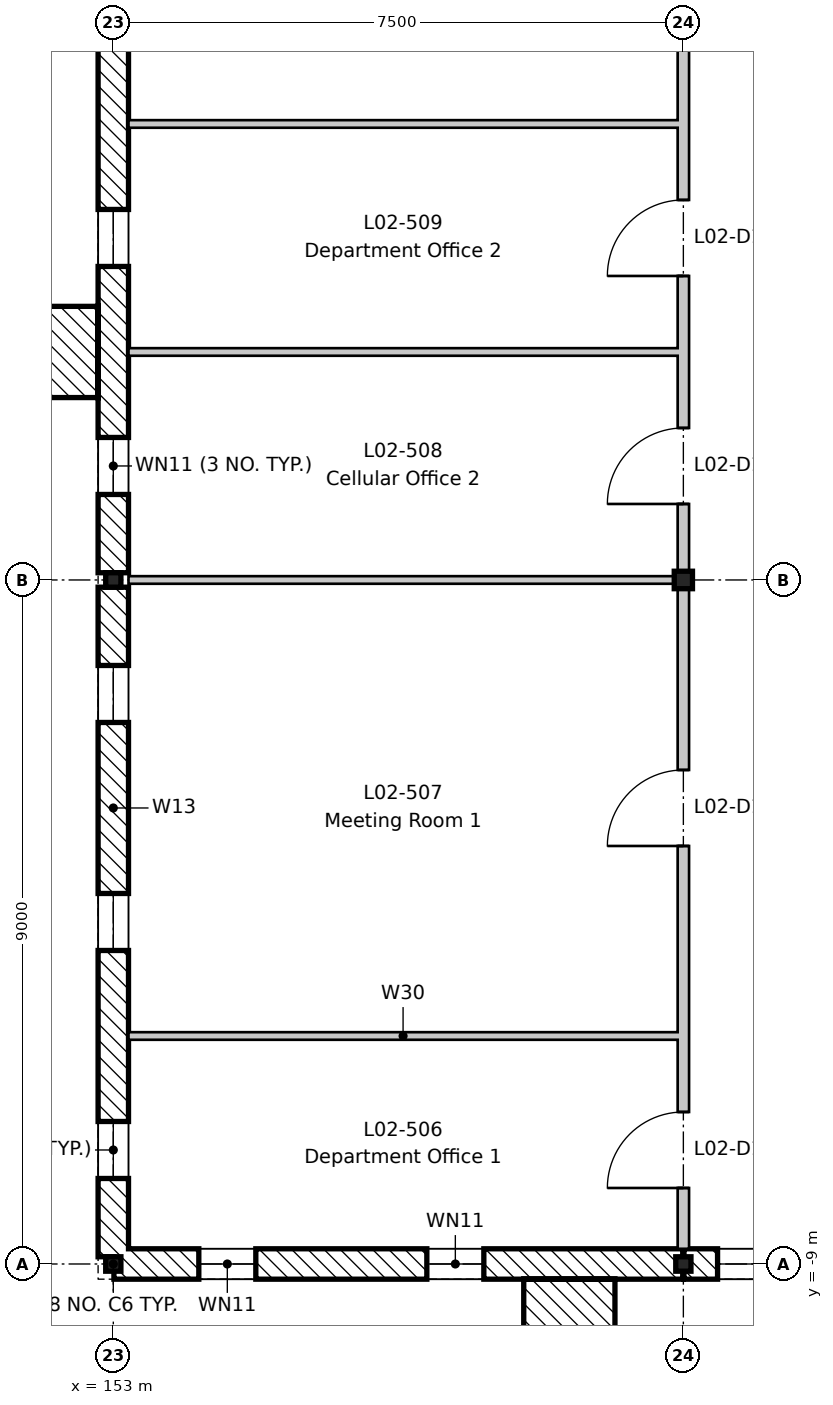
"""IFC4 building model, lengths in metres.
Left out: names, types, materials, properties, quantities, classifications, styles, units other than length and angle.
Written with IfcOpenShell. Run it as: python <this file> out.ifc"""

import sys

from ifc_helpers import new_model, si_unit, direction, frame, frame_2d, origin, origin_2d, place, context, subcontext, project, spatial, rectangle, i_section, extrude, element, fill, save


model = new_model("IFC4")
c1 = context("Model", 3, precision=1e-05, world=origin(), true_north=direction((0.0, 1.0)))
c2 = subcontext(c1, "Body", "Model", "MODEL_VIEW")
j1 = project(units=[si_unit("LENGTHUNIT", "METRE"), si_unit("PLANEANGLEUNIT", "RADIAN")], contexts=[c1])
p1 = place(None, origin())
s1 = spatial("IfcSite", under=j1, at=p1, CompositionType="ELEMENT")
p2 = place(p1, origin())
s2 = spatial("IfcBuilding", under=s1, at=p2, CompositionType="ELEMENT")
p3 = place(p2, frame((0.0, 0.0, 9.9)))
s3 = spatial("IfcBuildingStorey", under=s2, at=p3, CompositionType="ELEMENT", Elevation=9.9)
for number, where, z_axis, x_axis in (
    (1, (153.0, -9.0, -0.2), (0.0, 0.0, 1.0), (1.0, 0.0, 0.0)),
    (2, (153.0, 0.0, -0.2), (0.0, 0.0, 1.0), (1.0, 0.0, 0.0)),
    (3, (160.5, -9.0, -0.2), (0.0, 0.0, 1.0), (1.0, 0.0, 0.0)),
):
    element("IfcColumn", number, at=place(p3, frame(where, z_axis=z_axis, x_axis=x_axis)), inside=s3, PredefinedType="COLUMN", context=c2, shape_type="SweptSolid", body=[
        extrude(i_section(OverallWidth=0.2, OverallDepth=0.19, WebThickness=0.007, FlangeThickness=0.01, FilletRadius=0.018, at=origin_2d()), origin(), (0.0, 0.0, 1.0), 4.45),
    ])
p4 = place(p3, frame((160.5, 0.0, -0.2), z_axis=(0.0, 0.0, 1.0), x_axis=(1.0, 0.0, 0.0)))
e4 = element("IfcColumn", 4, at=p4, inside=s3, PredefinedType="COLUMN", context=c2, shape_type="SweptSolid", body=[
    extrude(i_section(OverallWidth=0.24, OverallDepth=0.23, WebThickness=0.008, FlangeThickness=0.012, FilletRadius=0.021, at=origin_2d()), origin(), (0.0, 0.0, 1.0), 4.45),
])
p5 = place(p3, frame((153.0, -8.905, 0.0), z_axis=(0.0, 0.0, 1.0), x_axis=(0.0, 1.0, 0.0)))
e5 = element("IfcWall", 5, at=p5, inside=s3, PredefinedType="STANDARD", context=c2, shape_type="SweptSolid", body=[
    extrude(rectangle(XDim=8.81, YDim=0.4, at=frame_2d((4.405, 0.0))), origin(), (0.0, 0.0, 1.0), 3.85),
])
p6 = place(p5, frame((1.03, 0.0, 1.5)))
e6 = element("IfcOpeningElement", 6, at=p6, cuts=e5, PredefinedType="OPENING", context=c2, shape_type="SweptSolid", body=[
    extrude(rectangle(XDim=0.75, YDim=1.2, at=frame_2d((0.375, 0.6))), frame((0.0, 0.21, 0.0), z_axis=(0.0, -1.0, 0.0), x_axis=(1.0, 0.0, 0.0)), (0.0, 0.0, 1.0), 0.42),
])
p7 = place(p5, frame((4.03, 0.0, 1.5)))
e7 = element("IfcOpeningElement", 7, at=p7, cuts=e5, PredefinedType="OPENING", context=c2, shape_type="SweptSolid", body=[
    extrude(rectangle(XDim=0.75, YDim=1.2, at=frame_2d((0.375, 0.6))), frame((0.0, 0.21, 0.0), z_axis=(0.0, -1.0, 0.0), x_axis=(1.0, 0.0, 0.0)), (0.0, 0.0, 1.0), 0.42),
])
p8 = place(p5, frame((7.03, 0.0, 1.5)))
e8 = element("IfcOpeningElement", 8, at=p8, cuts=e5, PredefinedType="OPENING", context=c2, shape_type="SweptSolid", body=[
    extrude(rectangle(XDim=0.75, YDim=1.2, at=frame_2d((0.375, 0.6))), frame((0.0, 0.21, 0.0), z_axis=(0.0, -1.0, 0.0), x_axis=(1.0, 0.0, 0.0)), (0.0, 0.0, 1.0), 0.42),
])
p9 = place(p3, frame((153.0, 0.095, 0.0), z_axis=(0.0, 0.0, 1.0), x_axis=(0.0, 1.0, 0.0)))
e9 = element("IfcWall", 9, at=p9, inside=s3, PredefinedType="STANDARD", context=c2, shape_type="SweptSolid", body=[
    extrude(rectangle(XDim=8.81, YDim=0.4, at=frame_2d((4.405, 0.0))), origin(), (0.0, 0.0, 1.0), 3.85),
])
p10 = place(p9, frame((1.03, 0.0, 1.5)))
e10 = element("IfcOpeningElement", 10, at=p10, cuts=e9, PredefinedType="OPENING", context=c2, shape_type="SweptSolid", body=[
    extrude(rectangle(XDim=0.75, YDim=1.2, at=frame_2d((0.375, 0.6))), frame((0.0, 0.21, 0.0), z_axis=(0.0, -1.0, 0.0), x_axis=(1.0, 0.0, 0.0)), (0.0, 0.0, 1.0), 0.42),
])
p11 = place(p9, frame((4.03, 0.0, 1.5)))
e11 = element("IfcOpeningElement", 11, at=p11, cuts=e9, PredefinedType="OPENING", context=c2, shape_type="SweptSolid", body=[
    extrude(rectangle(XDim=0.75, YDim=1.2, at=frame_2d((0.375, 0.6))), frame((0.0, 0.21, 0.0), z_axis=(0.0, -1.0, 0.0), x_axis=(1.0, 0.0, 0.0)), (0.0, 0.0, 1.0), 0.42),
])
p12 = place(p9, frame((7.03, 0.0, 1.5)))
e12 = element("IfcOpeningElement", 12, at=p12, cuts=e9, PredefinedType="OPENING", context=c2, shape_type="SweptSolid", body=[
    extrude(rectangle(XDim=0.75, YDim=1.2, at=frame_2d((0.375, 0.6))), frame((0.0, 0.21, 0.0), z_axis=(0.0, -1.0, 0.0), x_axis=(1.0, 0.0, 0.0)), (0.0, 0.0, 1.0), 0.42),
])
p13 = place(p3, frame((160.492, -9.0, 0.0), z_axis=(0.0, 0.0, 1.0), x_axis=(-1.0, 0.0, 0.0)))
e13 = element("IfcWall", 13, at=p13, inside=s3, PredefinedType="STANDARD", context=c2, shape_type="SweptSolid", body=[
    extrude(rectangle(XDim=7.483, YDim=0.4, at=frame_2d((3.742, 0.0))), origin(), (0.0, 0.0, 1.0), 3.92),
])
p14 = place(p13, frame((5.617, 0.0, 1.5)))
e14 = element("IfcOpeningElement", 14, at=p14, cuts=e13, PredefinedType="OPENING", context=c2, shape_type="SweptSolid", body=[
    extrude(rectangle(XDim=0.75, YDim=1.2, at=frame_2d((0.375, 0.6))), frame((0.0, 0.21, 0.0), z_axis=(0.0, -1.0, 0.0), x_axis=(1.0, 0.0, 0.0)), (0.0, 0.0, 1.0), 0.42),
])
p15 = place(p13, frame((2.617, 0.0, 1.5)))
e15 = element("IfcOpeningElement", 15, at=p15, cuts=e13, PredefinedType="OPENING", context=c2, shape_type="SweptSolid", body=[
    extrude(rectangle(XDim=0.75, YDim=1.2, at=frame_2d((0.375, 0.6))), frame((0.0, 0.21, 0.0), z_axis=(0.0, -1.0, 0.0), x_axis=(1.0, 0.0, 0.0)), (0.0, 0.0, 1.0), 0.42),
])
p16 = place(p3, frame((163.492, -9.0, 0.0), z_axis=(0.0, 0.0, 1.0), x_axis=(-1.0, 0.0, 0.0)))
e16 = element("IfcWall", 16, at=p16, inside=s3, PredefinedType="STANDARD", context=c2, shape_type="SweptSolid", body=[
    extrude(rectangle(XDim=2.983, YDim=0.4, at=frame_2d((1.492, 0.0))), origin(), (0.0, 0.0, 1.0), 4.05),
])
p17 = place(p16, frame((0.442, 0.0, 0.9)))
e17 = element("IfcOpeningElement", 17, at=p17, cuts=e16, PredefinedType="OPENING", context=c2, shape_type="SweptSolid", body=[
    extrude(rectangle(XDim=2.1, YDim=2.1, at=frame_2d((1.05, 1.05))), frame((0.0, 0.21, 0.0), z_axis=(0.0, -1.0, 0.0), x_axis=(1.0, 0.0, 0.0)), (0.0, 0.0, 1.0), 0.42),
])
for number, where, z_axis, x_axis in (
    (18, (152.2, 2.4, 0.0), (0.0, 0.0, 1.0), (0.0, 1.0, 0.0)),
    (19, (158.4, -9.8, 0.0), (0.0, 0.0, 1.0), (1.0, 0.0, 0.0)),
):
    element("IfcWall", number, at=place(p3, frame(where, z_axis=z_axis, x_axis=x_axis)), inside=s3, PredefinedType="STANDARD", context=c2, shape_type="SweptSolid", body=[
        extrude(rectangle(XDim=1.2, YDim=1.2, at=frame_2d((0.6, 0.0))), origin(), (0.0, 0.0, 1.0), 3.65),
    ])
p18 = place(p3, frame((153.2, -6.0, 0.0), z_axis=(0.0, 0.0, 1.0), x_axis=(1.0, 0.0, 0.0)))
e20 = element("IfcWall", 20, at=p18, inside=s3, PredefinedType="PARTITIONING", context=c2, shape_type="SweptSolid", body=[
    extrude(rectangle(XDim=7.225, YDim=0.1, at=frame_2d((3.613, 0.0))), origin(), (0.0, 0.0, 1.0), 4.25),
])
p19 = place(p3, frame((153.2, 0.0, 0.0), z_axis=(0.0, 0.0, 1.0), x_axis=(1.0, 0.0, 0.0)))
e21 = element("IfcWall", 21, at=p19, inside=s3, PredefinedType="PARTITIONING", context=c2, shape_type="SweptSolid", body=[
    extrude(rectangle(XDim=7.225, YDim=0.1, at=frame_2d((3.613, 0.0))), origin(), (0.0, 0.0, 1.0), 3.9),
])
for number, where, z_axis, x_axis in (
    (22, (153.2, 3.0, 0.0), (0.0, 0.0, 1.0), (1.0, 0.0, 0.0)),
    (23, (153.2, 6.0, 0.0), (0.0, 0.0, 1.0), (1.0, 0.0, 0.0)),
):
    element("IfcWall", number, at=place(p3, frame(where, z_axis=z_axis, x_axis=x_axis)), inside=s3, PredefinedType="PARTITIONING", context=c2, shape_type="SweptSolid", body=[
        extrude(rectangle(XDim=7.225, YDim=0.1, at=frame_2d((3.613, 0.0))), origin(), (0.0, 0.0, 1.0), 4.25),
    ])
p20 = place(p3, frame((160.5, -8.8, 0.0), z_axis=(0.0, 0.0, 1.0), x_axis=(0.0, 1.0, 0.0)))
e24 = element("IfcWall", 24, at=p20, inside=s3, PredefinedType="PARTITIONING", context=c2, shape_type="SweptSolid", body=[
    extrude(rectangle(XDim=62.6, YDim=0.15, at=frame_2d((31.3, 0.0))), origin(), (0.0, 0.0, 1.0), 3.73),
])
p21 = place(p20, frame((0.8, 0.0, 0.0)))
e25 = element("IfcOpeningElement", 25, at=p21, cuts=e24, PredefinedType="OPENING", context=c2, shape_type="SweptSolid", body=[
    extrude(rectangle(XDim=1.0, YDim=2.1, at=frame_2d((0.5, 1.05))), frame((0.0, 0.085, 0.0), z_axis=(0.0, -1.0, 0.0), x_axis=(1.0, 0.0, 0.0)), (0.0, 0.0, 1.0), 0.17),
])
p22 = place(p20, frame((5.3, 0.0, 0.0)))
e26 = element("IfcOpeningElement", 26, at=p22, cuts=e24, PredefinedType="OPENING", context=c2, shape_type="SweptSolid", body=[
    extrude(rectangle(XDim=1.0, YDim=2.1, at=frame_2d((0.5, 1.05))), frame((0.0, 0.085, 0.0), z_axis=(0.0, -1.0, 0.0), x_axis=(1.0, 0.0, 0.0)), (0.0, 0.0, 1.0), 0.17),
])
p23 = place(p20, frame((9.8, 0.0, 0.0)))
e27 = element("IfcOpeningElement", 27, at=p23, cuts=e24, PredefinedType="OPENING", context=c2, shape_type="SweptSolid", body=[
    extrude(rectangle(XDim=1.0, YDim=2.1, at=frame_2d((0.5, 1.05))), frame((0.0, 0.085, 0.0), z_axis=(0.0, -1.0, 0.0), x_axis=(1.0, 0.0, 0.0)), (0.0, 0.0, 1.0), 0.17),
])
p24 = place(p20, frame((12.8, 0.0, 0.0)))
e28 = element("IfcOpeningElement", 28, at=p24, cuts=e24, PredefinedType="OPENING", context=c2, shape_type="SweptSolid", body=[
    extrude(rectangle(XDim=1.0, YDim=2.1, at=frame_2d((0.5, 1.05))), frame((0.0, 0.085, 0.0), z_axis=(0.0, -1.0, 0.0), x_axis=(1.0, 0.0, 0.0)), (0.0, 0.0, 1.0), 0.17),
])
p25 = place(p20, frame((18.6, 0.0, 0.0)))
e29 = element("IfcOpeningElement", 29, at=p25, cuts=e24, PredefinedType="OPENING", context=c2, shape_type="SweptSolid", body=[
    extrude(rectangle(XDim=1.4, YDim=2.1, at=frame_2d((0.7, 1.05))), frame((0.0, 0.085, 0.0), z_axis=(0.0, -1.0, 0.0), x_axis=(1.0, 0.0, 0.0)), (0.0, 0.0, 1.0), 0.17),
])
p26 = place(p20, frame((27.55, 0.0, 0.0)))
e30 = element("IfcOpeningElement", 30, at=p26, cuts=e24, PredefinedType="OPENING", context=c2, shape_type="SweptSolid", body=[
    extrude(rectangle(XDim=1.0, YDim=2.1, at=frame_2d((0.5, 1.05))), frame((0.0, 0.085, 0.0), z_axis=(0.0, -1.0, 0.0), x_axis=(1.0, 0.0, 0.0)), (0.0, 0.0, 1.0), 0.17),
])
p27 = place(p20, frame((30.8, 0.0, 0.0)))
e31 = element("IfcOpeningElement", 31, at=p27, cuts=e24, PredefinedType="OPENING", context=c2, shape_type="SweptSolid", body=[
    extrude(rectangle(XDim=1.0, YDim=2.1, at=frame_2d((0.5, 1.05))), frame((0.0, 0.085, 0.0), z_axis=(0.0, -1.0, 0.0), x_axis=(1.0, 0.0, 0.0)), (0.0, 0.0, 1.0), 0.17),
])
p28 = place(p20, frame((33.8, 0.0, 0.0)))
e32 = element("IfcOpeningElement", 32, at=p28, cuts=e24, PredefinedType="OPENING", context=c2, shape_type="SweptSolid", body=[
    extrude(rectangle(XDim=1.0, YDim=2.1, at=frame_2d((0.5, 1.05))), frame((0.0, 0.085, 0.0), z_axis=(0.0, -1.0, 0.0), x_axis=(1.0, 0.0, 0.0)), (0.0, 0.0, 1.0), 0.17),
])
p29 = place(p20, frame((38.3, 0.0, 0.0)))
e33 = element("IfcOpeningElement", 33, at=p29, cuts=e24, PredefinedType="OPENING", context=c2, shape_type="SweptSolid", body=[
    extrude(rectangle(XDim=1.0, YDim=2.1, at=frame_2d((0.5, 1.05))), frame((0.0, 0.085, 0.0), z_axis=(0.0, -1.0, 0.0), x_axis=(1.0, 0.0, 0.0)), (0.0, 0.0, 1.0), 0.17),
])
p30 = place(p20, frame((42.8, 0.0, 0.0)))
e34 = element("IfcOpeningElement", 34, at=p30, cuts=e24, PredefinedType="OPENING", context=c2, shape_type="SweptSolid", body=[
    extrude(rectangle(XDim=1.0, YDim=2.1, at=frame_2d((0.5, 1.05))), frame((0.0, 0.085, 0.0), z_axis=(0.0, -1.0, 0.0), x_axis=(1.0, 0.0, 0.0)), (0.0, 0.0, 1.0), 0.17),
])
p31 = place(p20, frame((45.8, 0.0, 0.0)))
e35 = element("IfcOpeningElement", 35, at=p31, cuts=e24, PredefinedType="OPENING", context=c2, shape_type="SweptSolid", body=[
    extrude(rectangle(XDim=1.0, YDim=2.1, at=frame_2d((0.5, 1.05))), frame((0.0, 0.085, 0.0), z_axis=(0.0, -1.0, 0.0), x_axis=(1.0, 0.0, 0.0)), (0.0, 0.0, 1.0), 0.17),
])
p32 = place(p20, frame((50.3, 0.0, 0.0)))
e36 = element("IfcOpeningElement", 36, at=p32, cuts=e24, PredefinedType="OPENING", context=c2, shape_type="SweptSolid", body=[
    extrude(rectangle(XDim=1.0, YDim=2.1, at=frame_2d((0.5, 1.05))), frame((0.0, 0.085, 0.0), z_axis=(0.0, -1.0, 0.0), x_axis=(1.0, 0.0, 0.0)), (0.0, 0.0, 1.0), 0.17),
])
p33 = place(p20, frame((54.8, 0.0, 0.0)))
e37 = element("IfcOpeningElement", 37, at=p33, cuts=e24, PredefinedType="OPENING", context=c2, shape_type="SweptSolid", body=[
    extrude(rectangle(XDim=1.0, YDim=2.1, at=frame_2d((0.5, 1.05))), frame((0.0, 0.085, 0.0), z_axis=(0.0, -1.0, 0.0), x_axis=(1.0, 0.0, 0.0)), (0.0, 0.0, 1.0), 0.17),
])
p34 = place(p20, frame((57.8, 0.0, 0.0)))
e38 = element("IfcOpeningElement", 38, at=p34, cuts=e24, PredefinedType="OPENING", context=c2, shape_type="SweptSolid", body=[
    extrude(rectangle(XDim=1.0, YDim=2.1, at=frame_2d((0.5, 1.05))), frame((0.0, 0.085, 0.0), z_axis=(0.0, -1.0, 0.0), x_axis=(1.0, 0.0, 0.0)), (0.0, 0.0, 1.0), 0.17),
])
p35 = place(p20, frame((60.8, 0.0, 0.0)))
e39 = element("IfcOpeningElement", 39, at=p35, cuts=e24, PredefinedType="OPENING", context=c2, shape_type="SweptSolid", body=[
    extrude(rectangle(XDim=1.0, YDim=2.1, at=frame_2d((0.5, 1.05))), frame((0.0, 0.085, 0.0), z_axis=(0.0, -1.0, 0.0), x_axis=(1.0, 0.0, 0.0)), (0.0, 0.0, 1.0), 0.17),
])
p36 = place(p6, origin())
e40 = element("IfcWindow", 40, at=p36, inside=s3, PartitioningType="SINGLE_PANEL", PredefinedType="WINDOW", context=c2, shape_type="SweptSolid", body=[
    extrude(rectangle(XDim=0.75, YDim=1.2, at=frame_2d((0.375, 0.6))), frame((0.0, -0.12, 0.0), z_axis=(0.0, -1.0, 0.0), x_axis=(1.0, 0.0, 0.0)), (0.0, 0.0, 1.0), 0.06),
])
fill(e6, e40)
p37 = place(p7, origin())
e41 = element("IfcWindow", 41, at=p37, inside=s3, PartitioningType="SINGLE_PANEL", PredefinedType="WINDOW", context=c2, shape_type="SweptSolid", body=[
    extrude(rectangle(XDim=0.75, YDim=1.2, at=frame_2d((0.375, 0.6))), frame((0.0, -0.12, 0.0), z_axis=(0.0, -1.0, 0.0), x_axis=(1.0, 0.0, 0.0)), (0.0, 0.0, 1.0), 0.06),
])
fill(e7, e41)
p38 = place(p8, origin())
e42 = element("IfcWindow", 42, at=p38, inside=s3, PartitioningType="SINGLE_PANEL", PredefinedType="WINDOW", context=c2, shape_type="SweptSolid", body=[
    extrude(rectangle(XDim=0.75, YDim=1.2, at=frame_2d((0.375, 0.6))), frame((0.0, -0.12, 0.0), z_axis=(0.0, -1.0, 0.0), x_axis=(1.0, 0.0, 0.0)), (0.0, 0.0, 1.0), 0.06),
])
fill(e8, e42)
p39 = place(p10, origin())
e43 = element("IfcWindow", 43, at=p39, inside=s3, PartitioningType="SINGLE_PANEL", PredefinedType="WINDOW", context=c2, shape_type="SweptSolid", body=[
    extrude(rectangle(XDim=0.75, YDim=1.2, at=frame_2d((0.375, 0.6))), frame((0.0, -0.12, 0.0), z_axis=(0.0, -1.0, 0.0), x_axis=(1.0, 0.0, 0.0)), (0.0, 0.0, 1.0), 0.06),
])
fill(e10, e43)
p40 = place(p11, origin())
e44 = element("IfcWindow", 44, at=p40, inside=s3, PartitioningType="SINGLE_PANEL", PredefinedType="WINDOW", context=c2, shape_type="SweptSolid", body=[
    extrude(rectangle(XDim=0.75, YDim=1.2, at=frame_2d((0.375, 0.6))), frame((0.0, -0.12, 0.0), z_axis=(0.0, -1.0, 0.0), x_axis=(1.0, 0.0, 0.0)), (0.0, 0.0, 1.0), 0.06),
])
fill(e11, e44)
p41 = place(p14, origin())
e45 = element("IfcWindow", 45, at=p41, inside=s3, PartitioningType="SINGLE_PANEL", PredefinedType="WINDOW", context=c2, shape_type="SweptSolid", body=[
    extrude(rectangle(XDim=0.75, YDim=1.2, at=frame_2d((0.375, 0.6))), frame((0.0, -0.12, 0.0), z_axis=(0.0, -1.0, 0.0), x_axis=(1.0, 0.0, 0.0)), (0.0, 0.0, 1.0), 0.06),
])
fill(e14, e45)
p42 = place(p15, origin())
e46 = element("IfcWindow", 46, at=p42, inside=s3, PartitioningType="SINGLE_PANEL", PredefinedType="WINDOW", context=c2, shape_type="SweptSolid", body=[
    extrude(rectangle(XDim=0.75, YDim=1.2, at=frame_2d((0.375, 0.6))), frame((0.0, -0.12, 0.0), z_axis=(0.0, -1.0, 0.0), x_axis=(1.0, 0.0, 0.0)), (0.0, 0.0, 1.0), 0.06),
])
fill(e15, e46)
p43 = place(p17, origin())
e47 = element("IfcWindow", 47, at=p43, inside=s3, PartitioningType="SINGLE_PANEL", PredefinedType="WINDOW", context=c2, shape_type="SweptSolid", body=[
    extrude(rectangle(XDim=2.1, YDim=2.1, at=frame_2d((1.05, 1.05))), frame((0.0, -0.12, 0.0), z_axis=(0.0, -1.0, 0.0), x_axis=(1.0, 0.0, 0.0)), (0.0, 0.0, 1.0), 0.06),
])
fill(e17, e47)
p44 = place(p21, origin())
e48 = element("IfcDoor", 48, at=p44, inside=s3, OperationType="SINGLE_SWING_LEFT", PredefinedType="DOOR", context=c2, shape_type="SweptSolid", body=[
    extrude(rectangle(XDim=1.0, YDim=2.1, at=frame_2d((0.5, 1.05))), frame((0.0, 0.025, 0.0), z_axis=(0.0, -1.0, 0.0), x_axis=(1.0, 0.0, 0.0)), (0.0, 0.0, 1.0), 0.05),
])
fill(e25, e48)
p45 = place(p22, origin())
e49 = element("IfcDoor", 49, at=p45, inside=s3, OperationType="SINGLE_SWING_LEFT", PredefinedType="DOOR", context=c2, shape_type="SweptSolid", body=[
    extrude(rectangle(XDim=1.0, YDim=2.1, at=frame_2d((0.5, 1.05))), frame((0.0, 0.025, 0.0), z_axis=(0.0, -1.0, 0.0), x_axis=(1.0, 0.0, 0.0)), (0.0, 0.0, 1.0), 0.05),
])
fill(e26, e49)
p46 = place(p23, origin())
e50 = element("IfcDoor", 50, at=p46, inside=s3, OperationType="SINGLE_SWING_LEFT", PredefinedType="DOOR", context=c2, shape_type="SweptSolid", body=[
    extrude(rectangle(XDim=1.0, YDim=2.1, at=frame_2d((0.5, 1.05))), frame((0.0, 0.025, 0.0), z_axis=(0.0, -1.0, 0.0), x_axis=(1.0, 0.0, 0.0)), (0.0, 0.0, 1.0), 0.05),
])
fill(e27, e50)
p47 = place(p24, origin())
e51 = element("IfcDoor", 51, at=p47, inside=s3, OperationType="SINGLE_SWING_LEFT", PredefinedType="DOOR", context=c2, shape_type="SweptSolid", body=[
    extrude(rectangle(XDim=1.0, YDim=2.1, at=frame_2d((0.5, 1.05))), frame((0.0, 0.025, 0.0), z_axis=(0.0, -1.0, 0.0), x_axis=(1.0, 0.0, 0.0)), (0.0, 0.0, 1.0), 0.05),
])
fill(e28, e51)
save(model, sys.argv[1])
